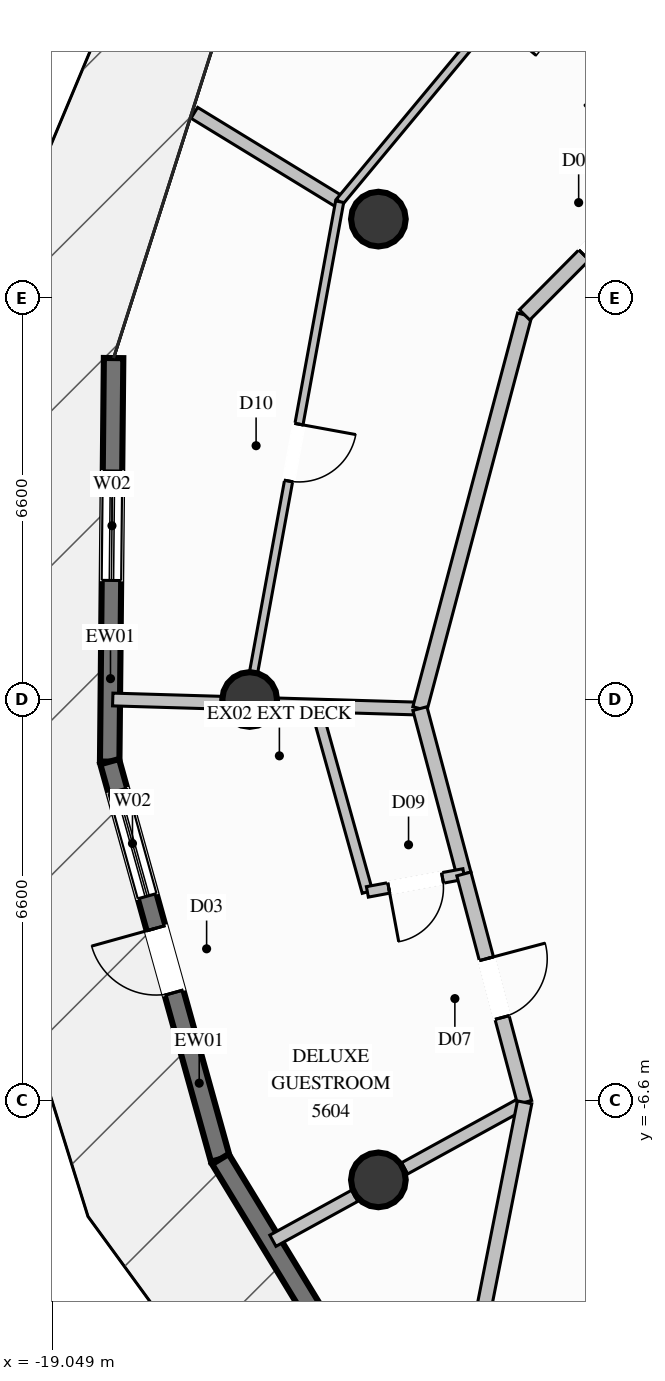
"""IFC4 building model, lengths in metres.
Left out: names, types, materials, properties, quantities, classifications, styles, units other than length and angle.
Written with IfcOpenShell. Run it as: python <this file> out.ifc"""

import sys

from ifc_helpers import new_model, si_unit, direction, frame, frame_2d, origin, origin_2d, place, context, subcontext, project, spatial, rectangle, circle, extrude, element, fill, save


model = new_model("IFC4")
c1 = context("Model", 3, precision=1e-05, world=origin(), true_north=direction((0.0, 1.0)))
c2 = subcontext(c1, "Body", "Model", "MODEL_VIEW")
j1 = project(units=[si_unit("LENGTHUNIT", "METRE"), si_unit("PLANEANGLEUNIT", "RADIAN")], contexts=[c1])
p1 = place(None, origin())
s1 = spatial("IfcSite", under=j1, at=p1, CompositionType="ELEMENT")
p2 = place(p1, origin())
s2 = spatial("IfcBuilding", under=s1, at=p2, CompositionType="ELEMENT")
p3 = place(p2, frame((0.0, 0.0, 209.2)))
s3 = spatial("IfcBuildingStorey", under=s2, at=p3, CompositionType="ELEMENT", Elevation=209.2)
for number, where, z_axis, x_axis in (
    (1, (-13.683, 7.9, 0.0), (0.0, 0.0, 1.0), (1.0, 0.0, 0.0)),
    (2, (-15.8, 0.0, 0.0), (0.0, 0.0, 1.0), (1.0, 0.0, 0.0)),
    (3, (-13.683, -7.9, 0.0), (0.0, 0.0, 1.0), (1.0, 0.0, 0.0)),
):
    element("IfcColumn", number, at=place(p3, frame(where, z_axis=z_axis, x_axis=x_axis)), inside=s3, PredefinedType="COLUMN", context=c2, shape_type="SweptSolid", body=[
        extrude(circle(Radius=0.45, at=origin_2d()), origin(), (0.0, 0.0, 1.0), 3.6),
    ])
p4 = place(p3, frame((-18.102, -1.022, 0.0), z_axis=(0.0, 0.0, 1.0), x_axis=(0.009637220267, 0.999953560914, 0.0)))
e4 = element("IfcWall", 4, at=p4, inside=s3, PredefinedType="SOLIDWALL", context=c2, shape_type="SweptSolid", body=[
    extrude(rectangle(XDim=6.637, YDim=0.32, at=frame_2d((3.319, 0.0))), origin(), (0.0, 0.0, 1.0), 3.36),
])
p5 = place(p4, frame((2.98, 0.0, 0.35)))
e5 = element("IfcOpeningElement", 5, at=p5, cuts=e4, PredefinedType="OPENING", context=c2, shape_type="SweptSolid", body=[
    extrude(rectangle(XDim=1.8, YDim=2.6, at=frame_2d((0.9, 1.3))), frame((0.0, 0.17, 0.0), z_axis=(0.0, -1.0, 0.0), x_axis=(1.0, 0.0, 0.0)), (0.0, 0.0, 1.0), 0.34),
])
p6 = place(p3, frame((-16.282, -7.558, 0.0), z_axis=(0.0, 0.0, 1.0), x_axis=(-0.268256249254, 0.963347592895, 0.0)))
e6 = element("IfcWall", 6, at=p6, inside=s3, PredefinedType="SOLIDWALL", context=c2, shape_type="SweptSolid", body=[
    extrude(rectangle(XDim=6.785, YDim=0.32, at=frame_2d((3.393, 0.0))), origin(), (0.0, 0.0, 1.0), 3.36),
])
p7 = place(p6, frame((4.488, 0.0, 0.35)))
e7 = element("IfcOpeningElement", 7, at=p7, cuts=e6, PredefinedType="OPENING", context=c2, shape_type="SweptSolid", body=[
    extrude(rectangle(XDim=1.8, YDim=2.6, at=frame_2d((0.9, 1.3))), frame((0.0, 0.17, 0.0), z_axis=(0.0, -1.0, 0.0), x_axis=(1.0, 0.0, 0.0)), (0.0, 0.0, 1.0), 0.34),
])
p8 = place(p6, frame((2.842, 0.0, 0.0)))
e8 = element("IfcOpeningElement", 8, at=p8, cuts=e6, PredefinedType="OPENING", context=c2, shape_type="SweptSolid", body=[
    extrude(rectangle(XDim=1.1, YDim=2.2, at=frame_2d((0.55, 1.1))), frame((0.0, 0.17, 0.0), z_axis=(0.0, -1.0, 0.0), x_axis=(1.0, 0.0, 0.0)), (0.0, 0.0, 1.0), 0.34),
])
p9 = place(p3, frame((-12.755, -13.355, 0.0), z_axis=(0.0, 0.0, 1.0), x_axis=(-0.519792847808, 0.854292336011, 0.0)))
e9 = element("IfcWall", 9, at=p9, inside=s3, PredefinedType="SOLIDWALL", context=c2, shape_type="SweptSolid", body=[
    extrude(rectangle(XDim=6.786, YDim=0.32, at=frame_2d((3.393, 0.0))), origin(), (0.0, 0.0, 1.0), 3.36),
])
p10 = place(p9, frame((1.645, 0.0, 0.35)))
e10 = element("IfcOpeningElement", 10, at=p10, cuts=e9, PredefinedType="OPENING", context=c2, shape_type="SweptSolid", body=[
    extrude(rectangle(XDim=1.8, YDim=2.6, at=frame_2d((0.9, 1.3))), frame((0.0, 0.17, 0.0), z_axis=(0.0, -1.0, 0.0), x_axis=(1.0, 0.0, 0.0)), (0.0, 0.0, 1.0), 0.34),
])
p11 = place(p3, frame((-13.0, -0.15, 0.0), z_axis=(0.0, 0.0, 1.0), x_axis=(-0.999566309164, 0.029448150771, 0.0)))
e11 = element("IfcWall", 11, at=p11, inside=s3, PredefinedType="PARTITIONING", context=c2, shape_type="SweptSolid", body=[
    extrude(rectangle(XDim=2.338, YDim=0.21, at=frame_2d((1.169, 0.0))), origin(), (0.0, 0.0, 1.0), 3.36),
])
p12 = place(p3, frame((-16.267, -0.053, 0.0), z_axis=(0.0, 0.0, 1.0), x_axis=(-0.999559800985, 0.029668236467, 0.0)))
e12 = element("IfcWall", 12, at=p12, inside=s3, PredefinedType="PARTITIONING", context=c2, shape_type="SweptSolid", body=[
    extrude(rectangle(XDim=1.786, YDim=0.21, at=frame_2d((0.893, 0.0))), origin(), (0.0, 0.0, 1.0), 3.36),
])
p13 = place(p3, frame((-11.278, -6.625, 0.0), z_axis=(0.0, 0.0, 1.0), x_axis=(-0.876259360779, -0.481839737513, 0.0)))
e13 = element("IfcWall", 13, at=p13, inside=s3, PredefinedType="PARTITIONING", context=c2, shape_type="SweptSolid", body=[
    extrude(rectangle(XDim=2.254, YDim=0.21, at=frame_2d((1.127, 0.0))), origin(), (0.0, 0.0, 1.0), 2.801),
])
p14 = place(p3, frame((-14.073, -8.162, 0.0), z_axis=(0.0, 0.0, 1.0), x_axis=(-0.876481145855, -0.481436185761, 0.0)))
e14 = element("IfcWall", 14, at=p14, inside=s3, PredefinedType="PARTITIONING", context=c2, shape_type="SweptSolid", body=[
    extrude(rectangle(XDim=1.534, YDim=0.21, at=frame_2d((0.767, 0.0))), origin(), (0.0, 0.0, 1.0), 3.36),
])
p15 = place(p3, frame((-14.32, 8.186, 0.0), z_axis=(0.0, 0.0, 1.0), x_axis=(-0.853055569856, 0.521820078895, 0.0)))
e15 = element("IfcWall", 15, at=p15, inside=s3, PredefinedType="PARTITIONING", context=c2, shape_type="SweptSolid", body=[
    extrude(rectangle(XDim=2.802, YDim=0.21, at=frame_2d((1.401, 0.0))), origin(), (0.0, 0.0, 1.0), 3.36),
])
p16 = place(p3, frame((-11.278, 6.325, 0.0), z_axis=(0.0, 0.0, 1.0), x_axis=(-0.257007135557, -0.966409505475, 0.0)))
e16 = element("IfcWall", 16, at=p16, inside=s3, PredefinedType="PARTITIONING", context=c2, shape_type="SweptSolid", body=[
    extrude(rectangle(XDim=6.7, YDim=0.24, at=frame_2d((3.35, 0.0))), origin(), (0.0, 0.0, 1.0), 3.36),
])
p17 = place(p3, frame((-8.55, 9.074, 0.0), z_axis=(0.0, 0.0, 1.0), x_axis=(-0.704390934975, -0.709812236246, 0.0)))
e17 = element("IfcWall", 17, at=p17, inside=s3, PredefinedType="PARTITIONING", context=c2, shape_type="SweptSolid", body=[
    extrude(rectangle(XDim=3.873, YDim=0.24, at=frame_2d((1.937, 0.0))), origin(), (0.0, 0.0, 1.0), 3.36),
])
p18 = place(p17, frame((1.386, 0.0, 0.0)))
e18 = element("IfcOpeningElement", 18, at=p18, cuts=e17, PredefinedType="OPENING", context=c2, shape_type="SweptSolid", body=[
    extrude(rectangle(XDim=1.1, YDim=2.3, at=frame_2d((0.55, 1.15))), frame((0.0, 0.13, 0.0), z_axis=(0.0, -1.0, 0.0), x_axis=(1.0, 0.0, 0.0)), (0.0, 0.0, 1.0), 0.26),
])
p19 = place(p3, frame((-8.707, 14.94, 0.0), z_axis=(0.0, 0.0, 1.0), x_axis=(-0.639161138837, -0.769072843495, 0.0)))
e19 = element("IfcWall", 19, at=p19, inside=s3, PredefinedType="PARTITIONING", context=c2, shape_type="SweptSolid", body=[
    extrude(rectangle(XDim=8.782, YDim=0.135, at=frame_2d((4.391, 0.0))), origin(), (0.0, 0.0, 1.0), 3.36),
])
p20 = place(p19, frame((3.916, 0.0, 0.0)))
e20 = element("IfcOpeningElement", 20, at=p20, cuts=e19, PredefinedType="OPENING", context=c2, shape_type="SweptSolid", body=[
    extrude(rectangle(XDim=0.95, YDim=2.1, at=frame_2d((0.475, 1.05))), frame((0.0, 0.078, 0.0), z_axis=(0.0, -1.0, 0.0), x_axis=(1.0, 0.0, 0.0)), (0.0, 0.0, 1.0), 0.155),
])
p21 = place(p3, frame((-14.32, 8.186, 0.0), z_axis=(0.0, 0.0, 1.0), x_axis=(-0.179886727607, -0.983687331031, 0.0)))
e21 = element("IfcWall", 21, at=p21, inside=s3, PredefinedType="PARTITIONING", context=c2, shape_type="SweptSolid", body=[
    extrude(rectangle(XDim=8.389, YDim=0.135, at=frame_2d((4.194, 0.0))), origin(), (0.0, 0.0, 1.0), 2.929),
])
p22 = place(p21, frame((3.719, 0.0, 0.0)))
e22 = element("IfcOpeningElement", 22, at=p22, cuts=e21, PredefinedType="OPENING", context=c2, shape_type="SweptSolid", body=[
    extrude(rectangle(XDim=0.95, YDim=2.1, at=frame_2d((0.475, 1.05))), frame((0.0, 0.078, 0.0), z_axis=(0.0, -1.0, 0.0), x_axis=(1.0, 0.0, 0.0)), (0.0, 0.0, 1.0), 0.155),
])
p23 = place(p3, frame((-13.0, -0.15, 0.0), z_axis=(0.0, 0.0, 1.0), x_axis=(0.256944245483, -0.966426228283, 0.0)))
e23 = element("IfcWall", 23, at=p23, inside=s3, PredefinedType="PARTITIONING", context=c2, shape_type="SweptSolid", body=[
    extrude(rectangle(XDim=2.813, YDim=0.24, at=frame_2d((1.407, 0.0))), origin(), (0.0, 0.0, 1.0), 3.36),
])
p24 = place(p3, frame((-14.718, -0.099, 0.0), z_axis=(0.0, 0.0, 1.0), x_axis=(0.268411547154, -0.963304334753, 0.0)))
e24 = element("IfcWall", 24, at=p24, inside=s3, PredefinedType="PLUMBINGWALL", context=c2, shape_type="SweptSolid", body=[
    extrude(rectangle(XDim=3.182, YDim=0.175, at=frame_2d((1.591, 0.0))), origin(), (0.0, 0.0, 1.0), 3.36),
])
p25 = place(p3, frame((-12.277, -2.869, 0.0), z_axis=(0.0, 0.0, 1.0), x_axis=(-0.983138271288, -0.18286371846, 0.0)))
e25 = element("IfcWall", 25, at=p25, inside=s3, PredefinedType="PLUMBINGWALL", context=c2, shape_type="SweptSolid", body=[
    extrude(rectangle(XDim=1.614, YDim=0.175, at=frame_2d((0.807, 0.0))), origin(), (0.0, 0.0, 1.0), 3.36),
])
p26 = place(p25, frame((0.357, 0.0, 0.0)))
e26 = element("IfcOpeningElement", 26, at=p26, cuts=e25, PredefinedType="OPENING", context=c2, shape_type="SweptSolid", body=[
    extrude(rectangle(XDim=0.9, YDim=2.1, at=frame_2d((0.45, 1.05))), frame((0.0, 0.098, 0.0), z_axis=(0.0, -1.0, 0.0), x_axis=(1.0, 0.0, 0.0)), (0.0, 0.0, 1.0), 0.195),
])
p27 = place(p3, frame((-12.277, -2.869, 0.0), z_axis=(0.0, 0.0, 1.0), x_axis=(0.257037057674, -0.966401547486, 0.0)))
e27 = element("IfcWall", 27, at=p27, inside=s3, PredefinedType="PARTITIONING", context=c2, shape_type="SweptSolid", body=[
    extrude(rectangle(XDim=3.887, YDim=0.24, at=frame_2d((1.943, 0.0))), origin(), (0.0, 0.0, 1.0), 3.36),
])
p28 = place(p27, frame((1.443, 0.0, 0.0)))
e28 = element("IfcOpeningElement", 28, at=p28, cuts=e27, PredefinedType="OPENING", context=c2, shape_type="SweptSolid", body=[
    extrude(rectangle(XDim=1.0, YDim=2.2, at=frame_2d((0.5, 1.1))), frame((0.0, 0.13, 0.0), z_axis=(0.0, -1.0, 0.0), x_axis=(1.0, 0.0, 0.0)), (0.0, 0.0, 1.0), 0.26),
])
p29 = place(p3, frame((-11.278, -6.625, 0.0), z_axis=(0.0, 0.0, 1.0), x_axis=(-0.193739123744, -0.981053083136, 0.0)))
e29 = element("IfcWall", 29, at=p29, inside=s3, PredefinedType="PARTITIONING", context=c2, shape_type="SweptSolid", body=[
    extrude(rectangle(XDim=5.275, YDim=0.24, at=frame_2d((2.637, 0.0))), origin(), (0.0, 0.0, 1.0), 3.36),
])
p30 = place(p5, origin())
e30 = element("IfcWindow", 30, at=p30, inside=s3, PartitioningType="SINGLE_PANEL", PredefinedType="WINDOW", context=c2, shape_type="SweptSolid", body=[
    extrude(rectangle(XDim=1.8, YDim=2.6, at=frame_2d((0.9, 1.3))), frame((0.0, 0.03, 0.0), z_axis=(0.0, -1.0, 0.0), x_axis=(1.0, 0.0, 0.0)), (0.0, 0.0, 1.0), 0.06),
])
fill(e5, e30)
p31 = place(p7, origin())
e31 = element("IfcWindow", 31, at=p31, inside=s3, PartitioningType="SINGLE_PANEL", PredefinedType="WINDOW", context=c2, shape_type="SweptSolid", body=[
    extrude(rectangle(XDim=1.8, YDim=2.6, at=frame_2d((0.9, 1.3))), frame((0.0, 0.03, 0.0), z_axis=(0.0, -1.0, 0.0), x_axis=(1.0, 0.0, 0.0)), (0.0, 0.0, 1.0), 0.06),
])
fill(e7, e31)
p32 = place(p8, origin())
e32 = element("IfcDoor", 32, at=p32, inside=s3, OperationType="SINGLE_SWING_RIGHT", PredefinedType="DOOR", context=c2, shape_type="SweptSolid", body=[
    extrude(rectangle(XDim=1.1, YDim=2.2, at=frame_2d((0.55, 1.1))), frame((0.0, 0.025, 0.0), z_axis=(0.0, -1.0, 0.0), x_axis=(1.0, 0.0, 0.0)), (0.0, 0.0, 1.0), 0.05),
])
fill(e8, e32)
p33 = place(p18, origin())
e33 = element("IfcDoor", 33, at=p33, inside=s3, OperationType="SINGLE_SWING_LEFT", PredefinedType="DOOR", context=c2, shape_type="SweptSolid", body=[
    extrude(rectangle(XDim=1.1, YDim=2.3, at=frame_2d((0.55, 1.15))), frame((0.0, 0.025, 0.0), z_axis=(0.0, -1.0, 0.0), x_axis=(1.0, 0.0, 0.0)), (0.0, 0.0, 1.0), 0.05),
])
fill(e18, e33)
p34 = place(p22, origin())
e34 = element("IfcDoor", 34, at=p34, inside=s3, OperationType="SINGLE_SWING_LEFT", PredefinedType="DOOR", context=c2, shape_type="SweptSolid", body=[
    extrude(rectangle(XDim=0.95, YDim=2.1, at=frame_2d((0.475, 1.05))), frame((0.0, 0.025, 0.0), z_axis=(0.0, -1.0, 0.0), x_axis=(1.0, 0.0, 0.0)), (0.0, 0.0, 1.0), 0.05),
])
fill(e22, e34)
p35 = place(p26, origin())
e35 = element("IfcDoor", 35, at=p35, inside=s3, OperationType="SINGLE_SWING_RIGHT", PredefinedType="DOOR", context=c2, shape_type="SweptSolid", body=[
    extrude(rectangle(XDim=0.9, YDim=2.1, at=frame_2d((0.45, 1.05))), frame((0.0, 0.025, 0.0), z_axis=(0.0, -1.0, 0.0), x_axis=(1.0, 0.0, 0.0)), (0.0, 0.0, 1.0), 0.05),
])
fill(e26, e35)
p36 = place(p28, origin())
e36 = element("IfcDoor", 36, at=p36, inside=s3, OperationType="SINGLE_SWING_LEFT", PredefinedType="DOOR", context=c2, shape_type="SweptSolid", body=[
    extrude(rectangle(XDim=1.0, YDim=2.2, at=frame_2d((0.5, 1.1))), frame((0.0, 0.025, 0.0), z_axis=(0.0, -1.0, 0.0), x_axis=(1.0, 0.0, 0.0)), (0.0, 0.0, 1.0), 0.05),
])
fill(e28, e36)
save(model, sys.argv[1])
